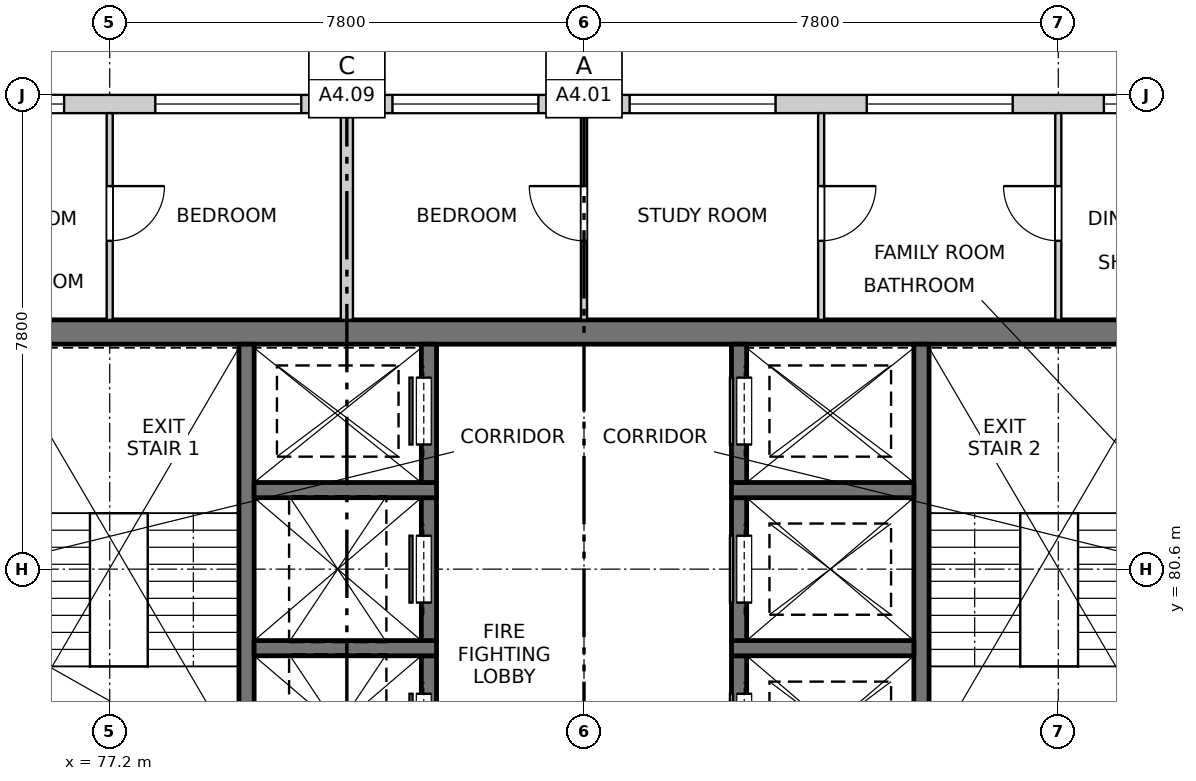
"""IFC4 building model, lengths in metres.
Left out: names, types, materials, properties, quantities, classifications, styles, units other than length and angle.
Written with IfcOpenShell. Run it as: python <this file> out.ifc"""

import sys

from ifc_helpers import new_model, si_unit, direction, frame, frame_2d, origin, place, context, subcontext, project, spatial, rectangle, extrude, element, fill, save


model = new_model("IFC4")
c1 = context("Model", 3, precision=1e-05, world=origin(), true_north=direction((0.0, 1.0)))
c2 = subcontext(c1, "Body", "Model", "MODEL_VIEW")
j1 = project(units=[si_unit("LENGTHUNIT", "METRE"), si_unit("PLANEANGLEUNIT", "RADIAN")], contexts=[c1])
p1 = place(None, origin())
s1 = spatial("IfcSite", under=j1, at=p1, CompositionType="ELEMENT")
p2 = place(p1, origin())
s2 = spatial("IfcBuilding", under=s1, at=p2, CompositionType="ELEMENT")
p3 = place(p2, frame((0.0, 0.0, 197.3)))
s3 = spatial("IfcBuildingStorey", under=s2, at=p3, CompositionType="ELEMENT", Elevation=197.3)
p4 = place(p3, frame((75.45, 84.5, -0.3), z_axis=(0.0, 0.0, 1.0), x_axis=(1.0, 0.0, 0.0)))
e1 = element("IfcWall", 1, at=p4, inside=s3, PredefinedType="SOLIDWALL", context=c2, shape_type="SweptSolid", body=[
    extrude(rectangle(XDim=19.1, YDim=0.4, at=frame_2d((9.55, 0.0))), origin(), (0.0, 0.0, 1.0), 3.45),
])
for number, where, z_axis, x_axis in (
    (2, (79.45, 77.3, -0.3), (0.0, 0.0, 1.0), (0.0, 1.0, 0.0)),
    (3, (90.55, 77.3, -0.3), (0.0, 0.0, 1.0), (0.0, 1.0, 0.0)),
):
    element("IfcWall", number, at=place(p3, frame(where, z_axis=z_axis, x_axis=x_axis)), inside=s3, PredefinedType="SOLIDWALL", context=c2, shape_type="SweptSolid", body=[
        extrude(rectangle(XDim=7.0, YDim=0.25, at=frame_2d((3.5, 0.0))), origin(), (0.0, 0.0, 1.0), 3.45),
    ])
p5 = place(p3, frame((82.45, 76.825, -0.3), z_axis=(0.0, 0.0, 1.0), x_axis=(0.0, 1.0, 0.0)))
e4 = element("IfcWall", 4, at=p5, inside=s3, PredefinedType="SOLIDWALL", context=c2, shape_type="SweptSolid", body=[
    extrude(rectangle(XDim=2.35, YDim=0.25, at=frame_2d((1.175, 0.0))), origin(), (0.0, 0.0, 1.0), 3.45),
])
p6 = place(p5, frame((0.625, 0.0, 0.3)))
e5 = element("IfcOpeningElement", 5, at=p6, cuts=e4, PredefinedType="OPENING", context=c2, shape_type="SweptSolid", body=[
    extrude(rectangle(XDim=1.1, YDim=2.1, at=frame_2d((0.55, 1.05))), frame((0.0, 0.135, 0.0), z_axis=(0.0, -1.0, 0.0), x_axis=(1.0, 0.0, 0.0)), (0.0, 0.0, 1.0), 0.27),
])
p7 = place(p3, frame((79.575, 79.3, -0.3), z_axis=(0.0, 0.0, 1.0), x_axis=(1.0, 0.0, 0.0)))
e6 = element("IfcWall", 6, at=p7, inside=s3, PredefinedType="SOLIDWALL", context=c2, shape_type="SweptSolid", body=[
    extrude(rectangle(XDim=3.0, YDim=0.25, at=frame_2d((1.5, 0.0))), origin(), (0.0, 0.0, 1.0), 3.45),
])
p8 = place(p3, frame((82.45, 79.425, -0.3), z_axis=(0.0, 0.0, 1.0), x_axis=(0.0, 1.0, 0.0)))
e7 = element("IfcWall", 7, at=p8, inside=s3, PredefinedType="SOLIDWALL", context=c2, shape_type="SweptSolid", body=[
    extrude(rectangle(XDim=2.35, YDim=0.25, at=frame_2d((1.175, 0.0))), origin(), (0.0, 0.0, 1.0), 3.45),
])
p9 = place(p8, frame((0.625, 0.0, 0.3)))
e8 = element("IfcOpeningElement", 8, at=p9, cuts=e7, PredefinedType="OPENING", context=c2, shape_type="SweptSolid", body=[
    extrude(rectangle(XDim=1.1, YDim=2.1, at=frame_2d((0.55, 1.05))), frame((0.0, 0.135, 0.0), z_axis=(0.0, -1.0, 0.0), x_axis=(1.0, 0.0, 0.0)), (0.0, 0.0, 1.0), 0.27),
])
p10 = place(p3, frame((79.575, 81.9, -0.3), z_axis=(0.0, 0.0, 1.0), x_axis=(1.0, 0.0, 0.0)))
e9 = element("IfcWall", 9, at=p10, inside=s3, PredefinedType="SOLIDWALL", context=c2, shape_type="SweptSolid", body=[
    extrude(rectangle(XDim=3.0, YDim=0.25, at=frame_2d((1.5, 0.0))), origin(), (0.0, 0.0, 1.0), 3.45),
])
p11 = place(p3, frame((82.45, 82.025, -0.3), z_axis=(0.0, 0.0, 1.0), x_axis=(0.0, 1.0, 0.0)))
e10 = element("IfcWall", 10, at=p11, inside=s3, PredefinedType="SOLIDWALL", context=c2, shape_type="SweptSolid", body=[
    extrude(rectangle(XDim=2.275, YDim=0.25, at=frame_2d((1.138, 0.0))), origin(), (0.0, 0.0, 1.0), 3.45),
])
p12 = place(p11, frame((0.625, 0.0, 0.3)))
e11 = element("IfcOpeningElement", 11, at=p12, cuts=e10, PredefinedType="OPENING", context=c2, shape_type="SweptSolid", body=[
    extrude(rectangle(XDim=1.1, YDim=2.1, at=frame_2d((0.55, 1.05))), frame((0.0, 0.135, 0.0), z_axis=(0.0, -1.0, 0.0), x_axis=(1.0, 0.0, 0.0)), (0.0, 0.0, 1.0), 0.27),
])
p13 = place(p3, frame((87.55, 76.825, -0.3), z_axis=(0.0, 0.0, 1.0), x_axis=(0.0, 1.0, 0.0)))
e12 = element("IfcWall", 12, at=p13, inside=s3, PredefinedType="SOLIDWALL", context=c2, shape_type="SweptSolid", body=[
    extrude(rectangle(XDim=2.35, YDim=0.25, at=frame_2d((1.175, 0.0))), origin(), (0.0, 0.0, 1.0), 3.45),
])
p14 = place(p13, frame((0.625, 0.0, 0.3)))
e13 = element("IfcOpeningElement", 13, at=p14, cuts=e12, PredefinedType="OPENING", context=c2, shape_type="SweptSolid", body=[
    extrude(rectangle(XDim=1.1, YDim=2.1, at=frame_2d((0.55, 1.05))), frame((0.0, 0.135, 0.0), z_axis=(0.0, -1.0, 0.0), x_axis=(1.0, 0.0, 0.0)), (0.0, 0.0, 1.0), 0.27),
])
p15 = place(p3, frame((87.425, 79.3, -0.3), z_axis=(0.0, 0.0, 1.0), x_axis=(1.0, 0.0, 0.0)))
e14 = element("IfcWall", 14, at=p15, inside=s3, PredefinedType="SOLIDWALL", context=c2, shape_type="SweptSolid", body=[
    extrude(rectangle(XDim=3.0, YDim=0.25, at=frame_2d((1.5, 0.0))), origin(), (0.0, 0.0, 1.0), 3.45),
])
p16 = place(p3, frame((87.55, 79.425, -0.3), z_axis=(0.0, 0.0, 1.0), x_axis=(0.0, 1.0, 0.0)))
e15 = element("IfcWall", 15, at=p16, inside=s3, PredefinedType="SOLIDWALL", context=c2, shape_type="SweptSolid", body=[
    extrude(rectangle(XDim=2.35, YDim=0.25, at=frame_2d((1.175, 0.0))), origin(), (0.0, 0.0, 1.0), 3.45),
])
p17 = place(p16, frame((0.625, 0.0, 0.3)))
e16 = element("IfcOpeningElement", 16, at=p17, cuts=e15, PredefinedType="OPENING", context=c2, shape_type="SweptSolid", body=[
    extrude(rectangle(XDim=1.1, YDim=2.1, at=frame_2d((0.55, 1.05))), frame((0.0, 0.135, 0.0), z_axis=(0.0, -1.0, 0.0), x_axis=(1.0, 0.0, 0.0)), (0.0, 0.0, 1.0), 0.27),
])
p18 = place(p3, frame((87.425, 81.9, -0.3), z_axis=(0.0, 0.0, 1.0), x_axis=(1.0, 0.0, 0.0)))
e17 = element("IfcWall", 17, at=p18, inside=s3, PredefinedType="SOLIDWALL", context=c2, shape_type="SweptSolid", body=[
    extrude(rectangle(XDim=3.0, YDim=0.25, at=frame_2d((1.5, 0.0))), origin(), (0.0, 0.0, 1.0), 3.45),
])
p19 = place(p3, frame((87.55, 82.025, -0.3), z_axis=(0.0, 0.0, 1.0), x_axis=(0.0, 1.0, 0.0)))
e18 = element("IfcWall", 18, at=p19, inside=s3, PredefinedType="SOLIDWALL", context=c2, shape_type="SweptSolid", body=[
    extrude(rectangle(XDim=2.275, YDim=0.25, at=frame_2d((1.138, 0.0))), origin(), (0.0, 0.0, 1.0), 3.45),
])
p20 = place(p19, frame((0.625, 0.0, 0.3)))
e19 = element("IfcOpeningElement", 19, at=p20, cuts=e18, PredefinedType="OPENING", context=c2, shape_type="SweptSolid", body=[
    extrude(rectangle(XDim=1.1, YDim=2.1, at=frame_2d((0.55, 1.05))), frame((0.0, 0.135, 0.0), z_axis=(0.0, -1.0, 0.0), x_axis=(1.0, 0.0, 0.0)), (0.0, 0.0, 1.0), 0.27),
])
p21 = place(p3, frame((73.7, 88.25, 0.0), z_axis=(0.0, 0.0, 1.0), x_axis=(1.0, 0.0, 0.0)))
e20 = element("IfcWall", 20, at=p21, inside=s3, PredefinedType="SOLIDWALL", context=c2, shape_type="SweptSolid", body=[
    extrude(rectangle(XDim=22.6, YDim=0.3, at=frame_2d((11.3, 0.0))), origin(), (0.0, 0.0, 1.0), 2.7),
])
p22 = place(p21, frame((0.35, 0.0, 0.9)))
e21 = element("IfcOpeningElement", 21, at=p22, cuts=e20, PredefinedType="OPENING", context=c2, shape_type="SweptSolid", body=[
    extrude(rectangle(XDim=2.4, YDim=1.8, at=frame_2d((1.2, 0.9))), frame((0.0, 0.16, 0.0), z_axis=(0.0, -1.0, 0.0), x_axis=(1.0, 0.0, 0.0)), (0.0, 0.0, 1.0), 0.32),
])
p23 = place(p21, frame((4.25, 0.0, 0.9)))
e22 = element("IfcOpeningElement", 22, at=p23, cuts=e20, PredefinedType="OPENING", context=c2, shape_type="SweptSolid", body=[
    extrude(rectangle(XDim=2.4, YDim=1.8, at=frame_2d((1.2, 0.9))), frame((0.0, 0.16, 0.0), z_axis=(0.0, -1.0, 0.0), x_axis=(1.0, 0.0, 0.0)), (0.0, 0.0, 1.0), 0.32),
])
p24 = place(p21, frame((8.15, 0.0, 0.9)))
e23 = element("IfcOpeningElement", 23, at=p24, cuts=e20, PredefinedType="OPENING", context=c2, shape_type="SweptSolid", body=[
    extrude(rectangle(XDim=2.4, YDim=1.8, at=frame_2d((1.2, 0.9))), frame((0.0, 0.16, 0.0), z_axis=(0.0, -1.0, 0.0), x_axis=(1.0, 0.0, 0.0)), (0.0, 0.0, 1.0), 0.32),
])
p25 = place(p21, frame((12.05, 0.0, 0.9)))
e24 = element("IfcOpeningElement", 24, at=p25, cuts=e20, PredefinedType="OPENING", context=c2, shape_type="SweptSolid", body=[
    extrude(rectangle(XDim=2.4, YDim=1.8, at=frame_2d((1.2, 0.9))), frame((0.0, 0.16, 0.0), z_axis=(0.0, -1.0, 0.0), x_axis=(1.0, 0.0, 0.0)), (0.0, 0.0, 1.0), 0.32),
])
p26 = place(p21, frame((15.95, 0.0, 0.9)))
e25 = element("IfcOpeningElement", 25, at=p26, cuts=e20, PredefinedType="OPENING", context=c2, shape_type="SweptSolid", body=[
    extrude(rectangle(XDim=2.4, YDim=1.8, at=frame_2d((1.2, 0.9))), frame((0.0, 0.16, 0.0), z_axis=(0.0, -1.0, 0.0), x_axis=(1.0, 0.0, 0.0)), (0.0, 0.0, 1.0), 0.32),
])
p27 = place(p21, frame((19.85, 0.0, 0.9)))
e26 = element("IfcOpeningElement", 26, at=p27, cuts=e20, PredefinedType="OPENING", context=c2, shape_type="SweptSolid", body=[
    extrude(rectangle(XDim=2.4, YDim=1.8, at=frame_2d((1.2, 0.9))), frame((0.0, 0.16, 0.0), z_axis=(0.0, -1.0, 0.0), x_axis=(1.0, 0.0, 0.0)), (0.0, 0.0, 1.0), 0.32),
])
p28 = place(p3, frame((77.2, 84.7, 0.0), z_axis=(0.0, 0.0, 1.0), x_axis=(0.0, 1.0, 0.0)))
e27 = element("IfcWall", 27, at=p28, inside=s3, PredefinedType="PARTITIONING", context=c2, shape_type="SweptSolid", body=[
    extrude(rectangle(XDim=3.4, YDim=0.1, at=frame_2d((1.7, 0.0))), origin(), (0.0, 0.0, 1.0), 3.15),
])
p29 = place(p28, frame((1.3, 0.0, 0.0)))
e28 = element("IfcOpeningElement", 28, at=p29, cuts=e27, PredefinedType="OPENING", context=c2, shape_type="SweptSolid", body=[
    extrude(rectangle(XDim=0.9, YDim=2.1, at=frame_2d((0.45, 1.05))), frame((0.0, 0.06, 0.0), z_axis=(0.0, -1.0, 0.0), x_axis=(1.0, 0.0, 0.0)), (0.0, 0.0, 1.0), 0.12),
])
p30 = place(p3, frame((81.1, 84.7, 0.0), z_axis=(0.0, 0.0, 1.0), x_axis=(0.0, 1.0, 0.0)))
e29 = element("IfcWall", 29, at=p30, inside=s3, PredefinedType="PARTITIONING", context=c2, shape_type="SweptSolid", body=[
    extrude(rectangle(XDim=3.4, YDim=0.2, at=frame_2d((1.7, 0.0))), origin(), (0.0, 0.0, 1.0), 3.15),
])
p31 = place(p3, frame((85.0, 84.7, 0.0), z_axis=(0.0, 0.0, 1.0), x_axis=(0.0, 1.0, 0.0)))
e30 = element("IfcWall", 30, at=p31, inside=s3, PredefinedType="PARTITIONING", context=c2, shape_type="SweptSolid", body=[
    extrude(rectangle(XDim=3.4, YDim=0.1, at=frame_2d((1.7, 0.0))), origin(), (0.0, 0.0, 1.0), 3.15),
])
p32 = place(p31, frame((1.3, 0.0, 0.0)))
e31 = element("IfcOpeningElement", 31, at=p32, cuts=e30, PredefinedType="OPENING", context=c2, shape_type="SweptSolid", body=[
    extrude(rectangle(XDim=0.9, YDim=2.1, at=frame_2d((0.45, 1.05))), frame((0.0, 0.06, 0.0), z_axis=(0.0, -1.0, 0.0), x_axis=(1.0, 0.0, 0.0)), (0.0, 0.0, 1.0), 0.12),
])
p33 = place(p3, frame((88.9, 84.7, 0.0), z_axis=(0.0, 0.0, 1.0), x_axis=(0.0, 1.0, 0.0)))
e32 = element("IfcWall", 32, at=p33, inside=s3, PredefinedType="PARTITIONING", context=c2, shape_type="SweptSolid", body=[
    extrude(rectangle(XDim=3.4, YDim=0.1, at=frame_2d((1.7, 0.0))), origin(), (0.0, 0.0, 1.0), 3.15),
])
p34 = place(p33, frame((1.3, 0.0, 0.0)))
e33 = element("IfcOpeningElement", 33, at=p34, cuts=e32, PredefinedType="OPENING", context=c2, shape_type="SweptSolid", body=[
    extrude(rectangle(XDim=0.9, YDim=2.1, at=frame_2d((0.45, 1.05))), frame((0.0, 0.06, 0.0), z_axis=(0.0, -1.0, 0.0), x_axis=(1.0, 0.0, 0.0)), (0.0, 0.0, 1.0), 0.12),
])
p35 = place(p3, frame((92.8, 84.7, 0.0), z_axis=(0.0, 0.0, 1.0), x_axis=(0.0, 1.0, 0.0)))
e34 = element("IfcWall", 34, at=p35, inside=s3, PredefinedType="PARTITIONING", context=c2, shape_type="SweptSolid", body=[
    extrude(rectangle(XDim=3.4, YDim=0.1, at=frame_2d((1.7, 0.0))), origin(), (0.0, 0.0, 1.0), 3.15),
])
p36 = place(p35, frame((1.3, 0.0, 0.0)))
e35 = element("IfcOpeningElement", 35, at=p36, cuts=e34, PredefinedType="OPENING", context=c2, shape_type="SweptSolid", body=[
    extrude(rectangle(XDim=0.9, YDim=2.1, at=frame_2d((0.45, 1.05))), frame((0.0, 0.06, 0.0), z_axis=(0.0, -1.0, 0.0), x_axis=(1.0, 0.0, 0.0)), (0.0, 0.0, 1.0), 0.12),
])
p37 = place(p22, origin())
e36 = element("IfcWindow", 36, at=p37, inside=s3, PartitioningType="DOUBLE_PANEL_VERTICAL", PredefinedType="WINDOW", context=c2, shape_type="SweptSolid", body=[
    extrude(rectangle(XDim=2.4, YDim=1.8, at=frame_2d((1.2, 0.9))), frame((0.0, 0.03, 0.0), z_axis=(0.0, -1.0, 0.0), x_axis=(1.0, 0.0, 0.0)), (0.0, 0.0, 1.0), 0.06),
])
fill(e21, e36)
p38 = place(p23, origin())
e37 = element("IfcWindow", 37, at=p38, inside=s3, PartitioningType="DOUBLE_PANEL_VERTICAL", PredefinedType="WINDOW", context=c2, shape_type="SweptSolid", body=[
    extrude(rectangle(XDim=2.4, YDim=1.8, at=frame_2d((1.2, 0.9))), frame((0.0, 0.03, 0.0), z_axis=(0.0, -1.0, 0.0), x_axis=(1.0, 0.0, 0.0)), (0.0, 0.0, 1.0), 0.06),
])
fill(e22, e37)
p39 = place(p24, origin())
e38 = element("IfcWindow", 38, at=p39, inside=s3, PartitioningType="DOUBLE_PANEL_VERTICAL", PredefinedType="WINDOW", context=c2, shape_type="SweptSolid", body=[
    extrude(rectangle(XDim=2.4, YDim=1.8, at=frame_2d((1.2, 0.9))), frame((0.0, 0.03, 0.0), z_axis=(0.0, -1.0, 0.0), x_axis=(1.0, 0.0, 0.0)), (0.0, 0.0, 1.0), 0.06),
])
fill(e23, e38)
p40 = place(p25, origin())
e39 = element("IfcWindow", 39, at=p40, inside=s3, PartitioningType="DOUBLE_PANEL_VERTICAL", PredefinedType="WINDOW", context=c2, shape_type="SweptSolid", body=[
    extrude(rectangle(XDim=2.4, YDim=1.8, at=frame_2d((1.2, 0.9))), frame((0.0, 0.03, 0.0), z_axis=(0.0, -1.0, 0.0), x_axis=(1.0, 0.0, 0.0)), (0.0, 0.0, 1.0), 0.06),
])
fill(e24, e39)
p41 = place(p26, origin())
e40 = element("IfcWindow", 40, at=p41, inside=s3, PartitioningType="DOUBLE_PANEL_VERTICAL", PredefinedType="WINDOW", context=c2, shape_type="SweptSolid", body=[
    extrude(rectangle(XDim=2.4, YDim=1.8, at=frame_2d((1.2, 0.9))), frame((0.0, 0.03, 0.0), z_axis=(0.0, -1.0, 0.0), x_axis=(1.0, 0.0, 0.0)), (0.0, 0.0, 1.0), 0.06),
])
fill(e25, e40)
p42 = place(p27, origin())
e41 = element("IfcWindow", 41, at=p42, inside=s3, PartitioningType="DOUBLE_PANEL_VERTICAL", PredefinedType="WINDOW", context=c2, shape_type="SweptSolid", body=[
    extrude(rectangle(XDim=2.4, YDim=1.8, at=frame_2d((1.2, 0.9))), frame((0.0, 0.03, 0.0), z_axis=(0.0, -1.0, 0.0), x_axis=(1.0, 0.0, 0.0)), (0.0, 0.0, 1.0), 0.06),
])
fill(e26, e41)
p43 = place(p6, origin())
e42 = element("IfcDoor", 42, at=p43, inside=s3, OperationType="SLIDING_TO_LEFT", PredefinedType="DOOR", context=c2, shape_type="SweptSolid", body=[
    extrude(rectangle(XDim=1.1, YDim=2.1, at=frame_2d((0.55, 1.05))), frame((0.0, 0.11, 0.0), z_axis=(0.0, -1.0, 0.0), x_axis=(1.0, 0.0, 0.0)), (0.0, 0.0, 1.0), 0.05),
])
fill(e5, e42)
p44 = place(p14, origin())
e43 = element("IfcDoor", 43, at=p44, inside=s3, OperationType="SLIDING_TO_LEFT", PredefinedType="DOOR", context=c2, shape_type="SweptSolid", body=[
    extrude(rectangle(XDim=1.1, YDim=2.1, at=frame_2d((0.55, 1.05))), frame((0.0, -0.06, 0.0), z_axis=(0.0, -1.0, 0.0), x_axis=(1.0, 0.0, 0.0)), (0.0, 0.0, 1.0), 0.05),
])
fill(e13, e43)
p45 = place(p9, origin())
e44 = element("IfcDoor", 44, at=p45, inside=s3, OperationType="SLIDING_TO_LEFT", PredefinedType="DOOR", context=c2, shape_type="SweptSolid", body=[
    extrude(rectangle(XDim=1.1, YDim=2.1, at=frame_2d((0.55, 1.05))), frame((0.0, 0.11, 0.0), z_axis=(0.0, -1.0, 0.0), x_axis=(1.0, 0.0, 0.0)), (0.0, 0.0, 1.0), 0.05),
])
fill(e8, e44)
p46 = place(p17, origin())
e45 = element("IfcDoor", 45, at=p46, inside=s3, OperationType="SLIDING_TO_RIGHT", PredefinedType="DOOR", context=c2, shape_type="SweptSolid", body=[
    extrude(rectangle(XDim=1.1, YDim=2.1, at=frame_2d((0.55, 1.05))), frame((0.0, -0.06, 0.0), z_axis=(0.0, -1.0, 0.0), x_axis=(1.0, 0.0, 0.0)), (0.0, 0.0, 1.0), 0.05),
])
fill(e16, e45)
p47 = place(p12, origin())
e46 = element("IfcDoor", 46, at=p47, inside=s3, OperationType="SLIDING_TO_RIGHT", PredefinedType="DOOR", context=c2, shape_type="SweptSolid", body=[
    extrude(rectangle(XDim=1.1, YDim=2.1, at=frame_2d((0.55, 1.05))), frame((0.0, 0.11, 0.0), z_axis=(0.0, -1.0, 0.0), x_axis=(1.0, 0.0, 0.0)), (0.0, 0.0, 1.0), 0.05),
])
fill(e11, e46)
p48 = place(p20, origin())
e47 = element("IfcDoor", 47, at=p48, inside=s3, OperationType="SLIDING_TO_RIGHT", PredefinedType="DOOR", context=c2, shape_type="SweptSolid", body=[
    extrude(rectangle(XDim=1.1, YDim=2.1, at=frame_2d((0.55, 1.05))), frame((0.0, -0.06, 0.0), z_axis=(0.0, -1.0, 0.0), x_axis=(1.0, 0.0, 0.0)), (0.0, 0.0, 1.0), 0.05),
])
fill(e19, e47)
p49 = place(p29, origin())
e48 = element("IfcDoor", 48, at=p49, inside=s3, OperationType="SINGLE_SWING_LEFT", PredefinedType="DOOR", context=c2, shape_type="SweptSolid", body=[
    extrude(rectangle(XDim=0.9, YDim=2.1, at=frame_2d((0.45, 1.05))), frame((0.0, 0.025, 0.0), z_axis=(0.0, -1.0, 0.0), x_axis=(1.0, 0.0, 0.0)), (0.0, 0.0, 1.0), 0.05),
])
fill(e28, e48)
p50 = place(p32, origin())
e49 = element("IfcDoor", 49, at=p50, inside=s3, OperationType="SINGLE_SWING_RIGHT", PredefinedType="DOOR", context=c2, shape_type="SweptSolid", body=[
    extrude(rectangle(XDim=0.9, YDim=2.1, at=frame_2d((0.45, 1.05))), frame((0.0, 0.025, 0.0), z_axis=(0.0, -1.0, 0.0), x_axis=(1.0, 0.0, 0.0)), (0.0, 0.0, 1.0), 0.05),
])
fill(e31, e49)
p51 = place(p34, origin())
e50 = element("IfcDoor", 50, at=p51, inside=s3, OperationType="SINGLE_SWING_LEFT", PredefinedType="DOOR", context=c2, shape_type="SweptSolid", body=[
    extrude(rectangle(XDim=0.9, YDim=2.1, at=frame_2d((0.45, 1.05))), frame((0.0, 0.025, 0.0), z_axis=(0.0, -1.0, 0.0), x_axis=(1.0, 0.0, 0.0)), (0.0, 0.0, 1.0), 0.05),
])
fill(e33, e50)
p52 = place(p36, origin())
e51 = element("IfcDoor", 51, at=p52, inside=s3, OperationType="SINGLE_SWING_RIGHT", PredefinedType="DOOR", context=c2, shape_type="SweptSolid", body=[
    extrude(rectangle(XDim=0.9, YDim=2.1, at=frame_2d((0.45, 1.05))), frame((0.0, 0.025, 0.0), z_axis=(0.0, -1.0, 0.0), x_axis=(1.0, 0.0, 0.0)), (0.0, 0.0, 1.0), 0.05),
])
fill(e35, e51)
save(model, sys.argv[1])
